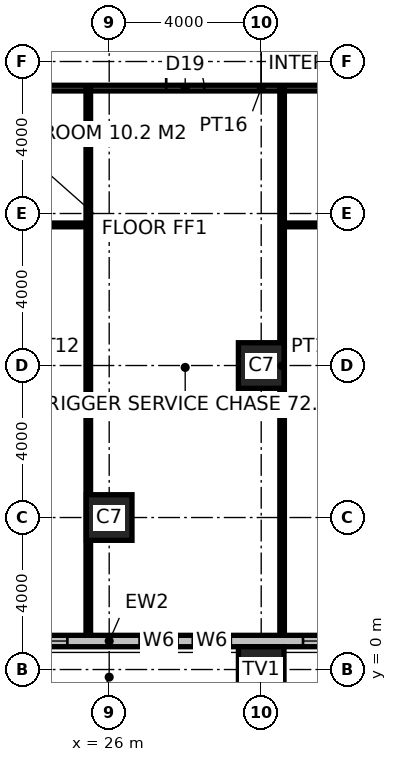
"""IFC4 building model, lengths in metres.
Left out: names, types, materials, properties, quantities, classifications, styles, units other than length and angle.
Written with IfcOpenShell. Run it as: python <this file> out.ifc"""

import sys

from ifc_helpers import new_model, si_unit, direction, frame, frame_2d, origin, origin_2d, place, context, subcontext, project, spatial, rectangle, hollow_rectangle, extrude, element, fill, save


model = new_model("IFC4")
c1 = context("Model", 3, precision=1e-05, world=origin(), true_north=direction((0.0, 1.0)))
c2 = subcontext(c1, "Body", "Model", "MODEL_VIEW")
j1 = project(units=[si_unit("LENGTHUNIT", "METRE"), si_unit("PLANEANGLEUNIT", "RADIAN")], contexts=[c1])
p1 = place(None, origin())
s1 = spatial("IfcSite", under=j1, at=p1, CompositionType="ELEMENT")
p2 = place(p1, origin())
s2 = spatial("IfcBuilding", under=s1, at=p2, CompositionType="ELEMENT")
p3 = place(p2, frame((0.0, 0.0, 43.0)))
s3 = spatial("IfcBuildingStorey", under=s2, at=p3, CompositionType="ELEMENT", Elevation=43.0)
p4 = place(p3, frame((30.0, 0.0, 0.0), z_axis=(0.0, 0.0, 1.0), x_axis=(1.0, 0.0, 0.0)))
e1 = element("IfcColumn", 1, at=p4, inside=s3, PredefinedType="USERDEFINED", context=c2, shape_type="SweptSolid", body=[
    extrude(hollow_rectangle(XDim=1.2, YDim=1.2, WallThickness=0.1, at=origin_2d()), origin(), (0.0, 0.0, 1.0), 4.0),
])
for number, where, z_axis, x_axis in (
    (2, (26.0, 4.0, 0.0), (0.0, 0.0, 1.0), (1.0, 0.0, 0.0)),
    (3, (30.0, 8.0, 0.0), (0.0, 0.0, 1.0), (1.0, 0.0, 0.0)),
):
    element("IfcColumn", number, at=place(p3, frame(where, z_axis=z_axis, x_axis=x_axis)), inside=s3, PredefinedType="COLUMN", context=c2, shape_type="SweptSolid", body=[
        extrude(hollow_rectangle(XDim=1.2, YDim=1.2, WallThickness=0.1, at=origin_2d()), origin(), (0.0, 0.0, 1.0), 4.0),
    ])
p5 = place(p3, frame((15.775, 15.3, 0.0), z_axis=(0.0, 0.0, 1.0), x_axis=(1.0, 0.0, 0.0)))
e4 = element("IfcWall", 4, at=p5, inside=s3, PredefinedType="PARTITIONING", context=c2, shape_type="SweptSolid", body=[
    extrude(rectangle(XDim=28.45, YDim=0.15, at=frame_2d((14.225, 0.0))), origin(), (0.0, 0.0, 1.0), 3.85),
])
p6 = place(p5, frame((11.725, 0.0, 0.0)))
e5 = element("IfcOpeningElement", 5, at=p6, cuts=e4, PredefinedType="OPENING", context=c2, shape_type="SweptSolid", body=[
    extrude(rectangle(XDim=1.0, YDim=2.2, at=frame_2d((0.5, 1.1))), frame((0.0, 0.085, 0.0), z_axis=(0.0, -1.0, 0.0), x_axis=(1.0, 0.0, 0.0)), (0.0, 0.0, 1.0), 0.17),
])
for number, where, z_axis, x_axis in (
    (6, (25.45, 0.68, 0.0), (0.0, 0.0, 1.0), (0.0, 1.0, 0.0)),
    (7, (30.55, 0.68, 0.0), (0.0, 0.0, 1.0), (0.0, 1.0, 0.0)),
):
    element("IfcWall", number, at=place(p3, frame(where, z_axis=z_axis, x_axis=x_axis)), inside=s3, PredefinedType="PARTITIONING", context=c2, shape_type="SweptSolid", body=[
        extrude(rectangle(XDim=14.62, YDim=0.12, at=frame_2d((7.31, 0.0))), origin(), (0.0, 0.0, 1.0), 2.65),
    ])
p7 = place(p3, frame((15.65, 11.7, 0.0), z_axis=(0.0, 0.0, 1.0), x_axis=(1.0, 0.0, 0.0)))
e8 = element("IfcWall", 8, at=p7, inside=s3, PredefinedType="PARTITIONING", context=c2, shape_type="SweptSolid", body=[
    extrude(rectangle(XDim=9.739, YDim=0.1, at=frame_2d((4.87, 0.0))), origin(), (0.0, 0.0, 1.0), 3.85),
])
p8 = place(p7, frame((1.175, 0.0, 0.0)))
e9 = element("IfcOpeningElement", 9, at=p8, cuts=e8, PredefinedType="OPENING", context=c2, shape_type="SweptSolid", body=[
    extrude(rectangle(XDim=1.0, YDim=2.2, at=frame_2d((0.5, 1.1))), frame((0.0, 0.06, 0.0), z_axis=(0.0, -1.0, 0.0), x_axis=(1.0, 0.0, 0.0)), (0.0, 0.0, 1.0), 0.12),
])
p9 = place(p7, frame((4.5, 0.0, 0.0)))
e10 = element("IfcOpeningElement", 10, at=p9, cuts=e8, PredefinedType="OPENING", context=c2, shape_type="SweptSolid", body=[
    extrude(rectangle(XDim=1.0, YDim=2.2, at=frame_2d((0.5, 1.1))), frame((0.0, 0.06, 0.0), z_axis=(0.0, -1.0, 0.0), x_axis=(1.0, 0.0, 0.0)), (0.0, 0.0, 1.0), 0.12),
])
p10 = place(p7, frame((7.75, 0.0, 0.0)))
e11 = element("IfcOpeningElement", 11, at=p10, cuts=e8, PredefinedType="OPENING", context=c2, shape_type="SweptSolid", body=[
    extrude(rectangle(XDim=1.0, YDim=2.2, at=frame_2d((0.5, 1.1))), frame((0.0, 0.06, 0.0), z_axis=(0.0, -1.0, 0.0), x_axis=(1.0, 0.0, 0.0)), (0.0, 0.0, 1.0), 0.12),
])
p11 = place(p3, frame((30.611, 11.7, 0.0), z_axis=(0.0, 0.0, 1.0), x_axis=(1.0, 0.0, 0.0)))
e12 = element("IfcWall", 12, at=p11, inside=s3, PredefinedType="PARTITIONING", context=c2, shape_type="SweptSolid", body=[
    extrude(rectangle(XDim=13.739, YDim=0.1, at=frame_2d((6.87, 0.0))), origin(), (0.0, 0.0, 1.0), 3.85),
])
p12 = place(p11, frame((1.065, 0.0, 0.0)))
e13 = element("IfcOpeningElement", 13, at=p12, cuts=e12, PredefinedType="OPENING", context=c2, shape_type="SweptSolid", body=[
    extrude(rectangle(XDim=1.0, YDim=2.2, at=frame_2d((0.5, 1.1))), frame((0.0, 0.06, 0.0), z_axis=(0.0, -1.0, 0.0), x_axis=(1.0, 0.0, 0.0)), (0.0, 0.0, 1.0), 0.12),
])
p13 = place(p11, frame((4.39, 0.0, 0.0)))
e14 = element("IfcOpeningElement", 14, at=p13, cuts=e12, PredefinedType="OPENING", context=c2, shape_type="SweptSolid", body=[
    extrude(rectangle(XDim=1.0, YDim=2.2, at=frame_2d((0.5, 1.1))), frame((0.0, 0.06, 0.0), z_axis=(0.0, -1.0, 0.0), x_axis=(1.0, 0.0, 0.0)), (0.0, 0.0, 1.0), 0.12),
])
p14 = place(p11, frame((7.14, 0.0, 0.0)))
e15 = element("IfcOpeningElement", 15, at=p14, cuts=e12, PredefinedType="OPENING", context=c2, shape_type="SweptSolid", body=[
    extrude(rectangle(XDim=1.0, YDim=2.2, at=frame_2d((0.5, 1.1))), frame((0.0, 0.06, 0.0), z_axis=(0.0, -1.0, 0.0), x_axis=(1.0, 0.0, 0.0)), (0.0, 0.0, 1.0), 0.12),
])
p15 = place(p11, frame((10.689, 0.0, 0.0)))
e16 = element("IfcOpeningElement", 16, at=p15, cuts=e12, PredefinedType="OPENING", context=c2, shape_type="SweptSolid", body=[
    extrude(rectangle(XDim=1.0, YDim=2.2, at=frame_2d((0.5, 1.1))), frame((0.0, 0.06, 0.0), z_axis=(0.0, -1.0, 0.0), x_axis=(1.0, 0.0, 0.0)), (0.0, 0.0, 1.0), 0.12),
])
p16 = place(p3, frame((1.6, 0.75, 0.0), z_axis=(0.0, 0.0, 1.0), x_axis=(1.0, 0.0, 0.0)))
e17 = element("IfcWall", 17, at=p16, inside=s3, PredefinedType="ELEMENTEDWALL", context=c2, shape_type="SweptSolid", body=[
    extrude(rectangle(XDim=48.8, YDim=0.3, at=frame_2d((24.4, 0.0))), origin(), (0.0, 0.0, 1.0), 3.85),
])
p17 = place(p16, frame((5.5, 0.0, 0.8)))
e18 = element("IfcOpeningElement", 18, at=p17, cuts=e17, PredefinedType="OPENING", context=c2, shape_type="SweptSolid", body=[
    extrude(rectangle(XDim=1.8, YDim=2.4, at=frame_2d((0.9, 1.2))), frame((0.0, 0.16, 0.0), z_axis=(0.0, -1.0, 0.0), x_axis=(1.0, 0.0, 0.0)), (0.0, 0.0, 1.0), 0.32),
])
p18 = place(p16, frame((9.5, 0.0, 0.0)))
e19 = element("IfcOpeningElement", 19, at=p18, cuts=e17, PredefinedType="OPENING", context=c2, shape_type="SweptSolid", body=[
    extrude(rectangle(XDim=1.8, YDim=2.4, at=frame_2d((0.9, 1.2))), frame((0.0, 0.16, 0.0), z_axis=(0.0, -1.0, 0.0), x_axis=(1.0, 0.0, 0.0)), (0.0, 0.0, 1.0), 0.32),
])
p19 = place(p16, frame((13.5, 0.0, 0.8)))
e20 = element("IfcOpeningElement", 20, at=p19, cuts=e17, PredefinedType="OPENING", context=c2, shape_type="SweptSolid", body=[
    extrude(rectangle(XDim=1.8, YDim=2.4, at=frame_2d((0.9, 1.2))), frame((0.0, 0.16, 0.0), z_axis=(0.0, -1.0, 0.0), x_axis=(1.0, 0.0, 0.0)), (0.0, 0.0, 1.0), 0.32),
])
p20 = place(p16, frame((17.5, 0.0, 0.8)))
e21 = element("IfcOpeningElement", 21, at=p20, cuts=e17, PredefinedType="OPENING", context=c2, shape_type="SweptSolid", body=[
    extrude(rectangle(XDim=1.8, YDim=2.4, at=frame_2d((0.9, 1.2))), frame((0.0, 0.16, 0.0), z_axis=(0.0, -1.0, 0.0), x_axis=(1.0, 0.0, 0.0)), (0.0, 0.0, 1.0), 0.32),
])
p21 = place(p16, frame((21.5, 0.0, 0.8)))
e22 = element("IfcOpeningElement", 22, at=p21, cuts=e17, PredefinedType="OPENING", context=c2, shape_type="SweptSolid", body=[
    extrude(rectangle(XDim=1.8, YDim=2.4, at=frame_2d((0.9, 1.2))), frame((0.0, 0.16, 0.0), z_axis=(0.0, -1.0, 0.0), x_axis=(1.0, 0.0, 0.0)), (0.0, 0.0, 1.0), 0.32),
])
p22 = place(p16, frame((25.2, 0.0, 0.8)))
e23 = element("IfcOpeningElement", 23, at=p22, cuts=e17, PredefinedType="OPENING", context=c2, shape_type="SweptSolid", body=[
    extrude(rectangle(XDim=1.0, YDim=2.4, at=frame_2d((0.5, 1.2))), frame((0.0, 0.16, 0.0), z_axis=(0.0, -1.0, 0.0), x_axis=(1.0, 0.0, 0.0)), (0.0, 0.0, 1.0), 0.32),
])
p23 = place(p16, frame((26.6, 0.0, 0.8)))
e24 = element("IfcOpeningElement", 24, at=p23, cuts=e17, PredefinedType="OPENING", context=c2, shape_type="SweptSolid", body=[
    extrude(rectangle(XDim=1.0, YDim=2.4, at=frame_2d((0.5, 1.2))), frame((0.0, 0.16, 0.0), z_axis=(0.0, -1.0, 0.0), x_axis=(1.0, 0.0, 0.0)), (0.0, 0.0, 1.0), 0.32),
])
p24 = place(p16, frame((29.5, 0.0, 0.8)))
e25 = element("IfcOpeningElement", 25, at=p24, cuts=e17, PredefinedType="OPENING", context=c2, shape_type="SweptSolid", body=[
    extrude(rectangle(XDim=1.8, YDim=2.4, at=frame_2d((0.9, 1.2))), frame((0.0, 0.16, 0.0), z_axis=(0.0, -1.0, 0.0), x_axis=(1.0, 0.0, 0.0)), (0.0, 0.0, 1.0), 0.32),
])
p25 = place(p16, frame((33.5, 0.0, 0.8)))
e26 = element("IfcOpeningElement", 26, at=p25, cuts=e17, PredefinedType="OPENING", context=c2, shape_type="SweptSolid", body=[
    extrude(rectangle(XDim=1.8, YDim=2.4, at=frame_2d((0.9, 1.2))), frame((0.0, 0.16, 0.0), z_axis=(0.0, -1.0, 0.0), x_axis=(1.0, 0.0, 0.0)), (0.0, 0.0, 1.0), 0.32),
])
p26 = place(p16, frame((37.5, 0.0, 0.0)))
e27 = element("IfcOpeningElement", 27, at=p26, cuts=e17, PredefinedType="OPENING", context=c2, shape_type="SweptSolid", body=[
    extrude(rectangle(XDim=1.8, YDim=2.4, at=frame_2d((0.9, 1.2))), frame((0.0, 0.16, 0.0), z_axis=(0.0, -1.0, 0.0), x_axis=(1.0, 0.0, 0.0)), (0.0, 0.0, 1.0), 0.32),
])
p27 = place(p16, frame((41.5, 0.0, 0.8)))
e28 = element("IfcOpeningElement", 28, at=p27, cuts=e17, PredefinedType="OPENING", context=c2, shape_type="SweptSolid", body=[
    extrude(rectangle(XDim=1.8, YDim=2.4, at=frame_2d((0.9, 1.2))), frame((0.0, 0.16, 0.0), z_axis=(0.0, -1.0, 0.0), x_axis=(1.0, 0.0, 0.0)), (0.0, 0.0, 1.0), 0.32),
])
p28 = place(p6, origin())
e29 = element("IfcDoor", 29, at=p28, inside=s3, OperationType="SINGLE_SWING_LEFT", PredefinedType="DOOR", context=c2, shape_type="SweptSolid", body=[
    extrude(rectangle(XDim=1.0, YDim=2.2, at=frame_2d((0.5, 1.1))), frame((0.0, 0.025, 0.0), z_axis=(0.0, -1.0, 0.0), x_axis=(1.0, 0.0, 0.0)), (0.0, 0.0, 1.0), 0.05),
])
fill(e5, e29)
p29 = place(p21, origin())
e30 = element("IfcWindow", 30, at=p29, inside=s3, PartitioningType="SINGLE_PANEL", PredefinedType="WINDOW", context=c2, shape_type="SweptSolid", body=[
    extrude(rectangle(XDim=1.8, YDim=2.4, at=frame_2d((0.9, 1.2))), frame((0.0, 0.03, 0.0), z_axis=(0.0, -1.0, 0.0), x_axis=(1.0, 0.0, 0.0)), (0.0, 0.0, 1.0), 0.06),
])
fill(e22, e30)
p30 = place(p22, origin())
e31 = element("IfcWindow", 31, at=p30, inside=s3, PartitioningType="SINGLE_PANEL", PredefinedType="WINDOW", context=c2, shape_type="SweptSolid", body=[
    extrude(rectangle(XDim=1.0, YDim=2.4, at=frame_2d((0.5, 1.2))), frame((0.0, 0.03, 0.0), z_axis=(0.0, -1.0, 0.0), x_axis=(1.0, 0.0, 0.0)), (0.0, 0.0, 1.0), 0.06),
])
fill(e23, e31)
p31 = place(p23, origin())
e32 = element("IfcWindow", 32, at=p31, inside=s3, PartitioningType="SINGLE_PANEL", PredefinedType="WINDOW", context=c2, shape_type="SweptSolid", body=[
    extrude(rectangle(XDim=1.0, YDim=2.4, at=frame_2d((0.5, 1.2))), frame((0.0, 0.03, 0.0), z_axis=(0.0, -1.0, 0.0), x_axis=(1.0, 0.0, 0.0)), (0.0, 0.0, 1.0), 0.06),
])
fill(e24, e32)
p32 = place(p24, origin())
e33 = element("IfcWindow", 33, at=p32, inside=s3, PartitioningType="SINGLE_PANEL", PredefinedType="WINDOW", context=c2, shape_type="SweptSolid", body=[
    extrude(rectangle(XDim=1.8, YDim=2.4, at=frame_2d((0.9, 1.2))), frame((0.0, 0.03, 0.0), z_axis=(0.0, -1.0, 0.0), x_axis=(1.0, 0.0, 0.0)), (0.0, 0.0, 1.0), 0.06),
])
fill(e25, e33)
save(model, sys.argv[1])
